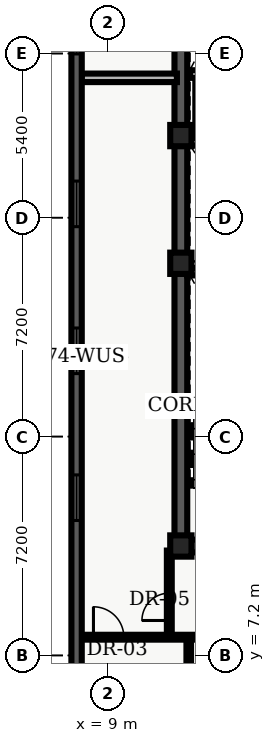
"""IFC4 building model, lengths in metres.
Left out: names, types, materials, properties, quantities, classifications, styles, units other than length and angle.
Written with IfcOpenShell. Run it as: python <this file> out.ifc"""

import sys

from ifc_helpers import new_model, entity, si_unit, converted_unit, direction, frame, origin_with_axes, origin_2d_with_axis, place, context, subcontext, project, spatial, polyline, rectangle, outline, extrude, element, fill, save


model = new_model("IFC4")
c1 = context("Model", 3, precision=1e-05, world=origin_with_axes(), true_north=direction((0.0, 1.0)))
c2 = subcontext(c1, "Body", "Model", "MODEL_VIEW")
j1 = project(units=[si_unit("LENGTHUNIT", "METRE"), converted_unit("PLANEANGLEUNIT", "DEGREE", entity("IfcPlaneAngleMeasure", 0.017), si_unit("PLANEANGLEUNIT", "RADIAN"), dimensions=[0, 0, 0, 0, 0, 0, 0])], contexts=[c1])
p1 = place(None, origin_with_axes())
s1 = spatial("IfcSite", under=j1, at=p1, CompositionType="ELEMENT")
p2 = place(p1, origin_with_axes())
s2 = spatial("IfcBuilding", under=s1, at=p2, CompositionType="ELEMENT")
p3 = place(p2, frame((0.0, 0.0, 299.7), z_axis=(0.0, 0.0, 1.0), x_axis=(1.0, 0.0, 0.0)))
s3 = spatial("IfcBuildingStorey", under=s2, at=p3, CompositionType="ELEMENT", Elevation=299.7)
p4 = place(p3, frame((11.4, 10.8, 0.0), z_axis=(0.0, 0.0, 1.0), x_axis=(0.0, 1.0, 0.0)))
e1 = element("IfcWall", 1, at=p4, inside=s3, PredefinedType="SHEAR", context=c2, shape_type="SweptSolid", body=[
    extrude(outline(polyline([(0.0, -0.21), (27.0, -0.21), (27.0, 0.21), (0.0, 0.21), (0.0, -0.21)])), origin_with_axes(), (0.0, 0.0, 1.0), 3.6),
])
p5 = place(p3, frame((11.4, 10.8, 0.0), z_axis=(0.0, 0.0, 1.0), x_axis=(1.0, 0.0, 0.0)))
e2 = element("IfcWall", 2, at=p5, inside=s3, PredefinedType="SHEAR", context=c2, shape_type="SweptSolid", body=[
    extrude(outline(polyline([(0.0, -0.21), (7.2, -0.21), (7.2, 0.21), (0.0, 0.21), (0.0, -0.21)])), origin_with_axes(), (0.0, 0.0, 1.0), 3.6),
])
p6 = place(p5, frame((2.625, 0.0, 0.0), z_axis=(0.0, 0.0, 1.0), x_axis=(1.0, 0.0, 0.0)))
e3 = element("IfcOpeningElement", 3, at=p6, cuts=e2, PredefinedType="OPENING", context=c2, shape_type="SweptSolid", body=[
    extrude(rectangle(XDim=1.05, YDim=0.44, at=origin_2d_with_axis()), origin_with_axes(), (0.0, 0.0, 1.0), 2.15),
])
p7 = place(p3, frame((11.61, 19.825, 0.0), z_axis=(0.0, 0.0, 1.0), x_axis=(1.0, 0.0, 0.0)))
e4 = element("IfcWall", 4, at=p7, inside=s3, PredefinedType="SHEAR", context=c2, shape_type="SweptSolid", body=[
    extrude(outline(polyline([(0.0, -0.125), (6.78, -0.125), (6.78, 0.125), (0.0, 0.125), (0.0, -0.125)])), origin_with_axes(), (0.0, 0.0, 1.0), 3.6),
])
p8 = place(p3, frame((11.7, 24.1, 0.0), z_axis=(0.0, 0.0, 1.0), x_axis=(1.0, 0.0, 0.0)))
e5 = element("IfcWall", 5, at=p8, inside=s3, PredefinedType="SOLIDWALL", context=c2, shape_type="SweptSolid", body=[
    extrude(outline(polyline([(0.0, -0.125), (6.6, -0.125), (6.6, 0.125), (0.0, 0.125), (0.0, -0.125)])), origin_with_axes(), (0.0, 0.0, 1.0), 2.64),
])
p9 = place(p8, frame((3.6, 0.0, 0.0), z_axis=(0.0, 0.0, 1.0), x_axis=(1.0, 0.0, 0.0)))
e6 = element("IfcOpeningElement", 6, at=p9, cuts=e5, PredefinedType="OPENING", context=c2, shape_type="SweptSolid", body=[
    extrude(rectangle(XDim=0.9, YDim=0.27, at=origin_2d_with_axis()), origin_with_axes(), (0.0, 0.0, 1.0), 2.15),
])
p10 = place(p8, frame((5.65, 0.0, 0.0), z_axis=(0.0, 0.0, 1.0), x_axis=(1.0, 0.0, 0.0)))
e7 = element("IfcOpeningElement", 7, at=p10, cuts=e5, PredefinedType="OPENING", context=c2, shape_type="SweptSolid", body=[
    extrude(rectangle(XDim=0.9, YDim=0.27, at=origin_2d_with_axis()), origin_with_axes(), (0.0, 0.0, 1.0), 2.15),
])
p11 = place(p3, frame((11.7, 26.325, 0.0), z_axis=(0.0, 0.0, 1.0), x_axis=(1.0, 0.0, 0.0)))
e8 = element("IfcWall", 8, at=p11, inside=s3, PredefinedType="SOLIDWALL", context=c2, shape_type="SweptSolid", body=[
    extrude(outline(polyline([(0.0, -0.125), (6.6, -0.125), (6.6, 0.125), (0.0, 0.125), (0.0, -0.125)])), origin_with_axes(), (0.0, 0.0, 1.0), 2.64),
])
p12 = place(p11, frame((3.5, 0.0, 0.0), z_axis=(0.0, 0.0, 1.0), x_axis=(1.0, 0.0, 0.0)))
e9 = element("IfcOpeningElement", 9, at=p12, cuts=e8, PredefinedType="OPENING", context=c2, shape_type="SweptSolid", body=[
    extrude(rectangle(XDim=0.9, YDim=0.27, at=origin_2d_with_axis()), origin_with_axes(), (0.0, 0.0, 1.0), 2.15),
])
for number, where, z_axis, x_axis in (
    (10, (11.4, 10.8, 0.0), (0.0, 0.0, 1.0), (1.0, 0.0, 0.0)),
    (11, (11.4, 20.1, 0.0), (0.0, 0.0, 1.0), (1.0, 0.0, 0.0)),
    (12, (11.4, 24.3, 0.0), (0.0, 0.0, 1.0), (1.0, 0.0, 0.0)),
):
    element("IfcColumn", number, at=place(p3, frame(where, z_axis=z_axis, x_axis=x_axis)), inside=s3, PredefinedType="COLUMN", context=c2, shape_type="SweptSolid", body=[
        extrude(rectangle(XDim=0.7, YDim=0.7, at=origin_2d_with_axis()), origin_with_axes(), (0.0, 0.0, 1.0), 3.9),
    ])
p13 = place(p3, frame((8.135, 7.8, 0.0), z_axis=(0.0, 0.0, 1.0), x_axis=(1.0, 0.0, 0.0)))
e13 = element("IfcWall", 13, at=p13, inside=s3, PredefinedType="PARTITIONING", context=c2, shape_type="SweptSolid", body=[
    extrude(outline(polyline([(0.0, -0.08), (12.165, -0.08), (12.165, 0.08), (0.0, 0.08), (0.0, -0.08)])), origin_with_axes(), (0.0, 0.0, 1.0), 2.64),
])
p14 = place(p13, frame((0.89, 0.0, 0.0), z_axis=(0.0, 0.0, 1.0), x_axis=(1.0, 0.0, 0.0)))
e14 = element("IfcOpeningElement", 14, at=p14, cuts=e13, PredefinedType="OPENING", context=c2, shape_type="SweptSolid", body=[
    extrude(rectangle(XDim=1.0, YDim=0.18, at=origin_2d_with_axis()), origin_with_axes(), (0.0, 0.0, 1.0), 2.15),
])
p15 = place(p13, frame((5.482, 0.0, 0.0), z_axis=(0.0, 0.0, 1.0), x_axis=(1.0, 0.0, 0.0)))
e15 = element("IfcOpeningElement", 15, at=p15, cuts=e13, PredefinedType="OPENING", context=c2, shape_type="SweptSolid", body=[
    extrude(rectangle(XDim=1.0, YDim=0.18, at=origin_2d_with_axis()), origin_with_axes(), (0.0, 0.0, 1.0), 2.15),
])
p16 = place(p13, frame((9.777, 0.0, 0.0), z_axis=(0.0, 0.0, 1.0), x_axis=(1.0, 0.0, 0.0)))
e16 = element("IfcOpeningElement", 16, at=p16, cuts=e13, PredefinedType="OPENING", context=c2, shape_type="SweptSolid", body=[
    extrude(rectangle(XDim=1.0, YDim=0.18, at=origin_2d_with_axis()), origin_with_axes(), (0.0, 0.0, 1.0), 2.15),
])
p17 = place(p3, frame((11.02, 7.8, 0.0), z_axis=(0.0, 0.0, 1.0), x_axis=(0.0, 1.0, 0.0)))
e17 = element("IfcWall", 17, at=p17, inside=s3, PredefinedType="PARTITIONING", context=c2, shape_type="SweptSolid", body=[
    extrude(outline(polyline([(0.0, -0.08), (2.85, -0.08), (2.85, 0.08), (0.0, 0.08), (0.0, -0.08)])), origin_with_axes(), (0.0, 0.0, 1.0), 2.64),
])
p18 = place(p17, frame((1.0, 0.0, 0.0), z_axis=(0.0, 0.0, 1.0), x_axis=(1.0, 0.0, 0.0)))
e18 = element("IfcOpeningElement", 18, at=p18, cuts=e17, PredefinedType="OPENING", context=c2, shape_type="SweptSolid", body=[
    extrude(rectangle(XDim=0.9, YDim=0.18, at=origin_2d_with_axis()), origin_with_axes(), (0.0, 0.0, 1.0), 2.15),
])
p19 = place(p3, frame((8.135, 26.2, 0.0), z_axis=(0.0, 0.0, 1.0), x_axis=(1.0, 0.0, 0.0)))
e19 = element("IfcWall", 19, at=p19, inside=s3, PredefinedType="PARTITIONING", context=c2, shape_type="SweptSolid", body=[
    extrude(outline(polyline([(0.0, -0.14), (3.135, -0.14), (3.135, 0.14), (0.0, 0.14), (0.0, -0.14)])), origin_with_axes(), (0.0, 0.0, 1.0), 2.64),
])
p20 = place(p3, frame((11.659, 2.135, 0.0), z_axis=(0.0, 0.0, 1.0), x_axis=(0.0, 1.0, 0.0)))
e20 = element("IfcWall", 20, at=p20, inside=s3, PredefinedType="PARTITIONING", context=c2, shape_type="SweptSolid", body=[
    extrude(outline(polyline([(0.0, -0.075), (5.565, -0.075), (5.565, 0.075), (0.0, 0.075), (0.0, -0.075)])), origin_with_axes(), (0.0, 0.0, 1.0), 2.64),
])
p21 = place(p3, frame((7.97, 4.54, 0.0), z_axis=(0.0, 0.0, 1.0), x_axis=(0.0, 1.0, 0.0)))
e21 = element("IfcWall", 21, at=p21, inside=s3, PredefinedType="SOLIDWALL", context=c2, shape_type="SweptSolid", body=[
    extrude(outline(polyline([(0.0, -0.17), (39.86, -0.17), (39.86, 0.17), (0.0, 0.17), (0.0, -0.17)])), origin_with_axes(), (0.0, 0.0, 1.0), 3.6),
])
p22 = place(p21, frame((7.849, 0.0, 0.45), z_axis=(0.0, 0.0, 1.0), x_axis=(1.0, 0.0, 0.0)))
e22 = element("IfcOpeningElement", 22, at=p22, cuts=e21, PredefinedType="OPENING", context=c2, shape_type="SweptSolid", body=[
    extrude(rectangle(XDim=1.5, YDim=0.36, at=origin_2d_with_axis()), origin_with_axes(), (0.0, 0.0, 1.0), 2.1),
])
p23 = place(p21, frame((12.681, 0.0, 0.45), z_axis=(0.0, 0.0, 1.0), x_axis=(1.0, 0.0, 0.0)))
e23 = element("IfcOpeningElement", 23, at=p23, cuts=e21, PredefinedType="OPENING", context=c2, shape_type="SweptSolid", body=[
    extrude(rectangle(XDim=1.5, YDim=0.36, at=origin_2d_with_axis()), origin_with_axes(), (0.0, 0.0, 1.0), 2.1),
])
p24 = place(p21, frame((17.514, 0.0, 0.45), z_axis=(0.0, 0.0, 1.0), x_axis=(1.0, 0.0, 0.0)))
e24 = element("IfcOpeningElement", 24, at=p24, cuts=e21, PredefinedType="OPENING", context=c2, shape_type="SweptSolid", body=[
    extrude(rectangle(XDim=1.5, YDim=0.36, at=origin_2d_with_axis()), origin_with_axes(), (0.0, 0.0, 1.0), 2.1),
])
p25 = place(p21, frame((23.196, 0.0, 0.45), z_axis=(0.0, 0.0, 1.0), x_axis=(1.0, 0.0, 0.0)))
e25 = element("IfcOpeningElement", 25, at=p25, cuts=e21, PredefinedType="OPENING", context=c2, shape_type="SweptSolid", body=[
    extrude(rectangle(XDim=1.5, YDim=0.36, at=origin_2d_with_axis()), origin_with_axes(), (0.0, 0.0, 1.0), 2.1),
])
p26 = place(p21, frame((27.179, 0.0, 0.45), z_axis=(0.0, 0.0, 1.0), x_axis=(1.0, 0.0, 0.0)))
e26 = element("IfcOpeningElement", 26, at=p26, cuts=e21, PredefinedType="OPENING", context=c2, shape_type="SweptSolid", body=[
    extrude(rectangle(XDim=1.5, YDim=0.36, at=origin_2d_with_axis()), origin_with_axes(), (0.0, 0.0, 1.0), 2.1),
])
p27 = place(p21, frame((32.011, 0.0, 0.45), z_axis=(0.0, 0.0, 1.0), x_axis=(1.0, 0.0, 0.0)))
e27 = element("IfcOpeningElement", 27, at=p27, cuts=e21, PredefinedType="OPENING", context=c2, shape_type="SweptSolid", body=[
    extrude(rectangle(XDim=1.5, YDim=0.36, at=origin_2d_with_axis()), origin_with_axes(), (0.0, 0.0, 1.0), 2.1),
])
p28 = place(p21, frame((37.294, 0.0, 0.45), z_axis=(0.0, 0.0, 1.0), x_axis=(1.0, 0.0, 0.0)))
e28 = element("IfcOpeningElement", 28, at=p28, cuts=e21, PredefinedType="OPENING", context=c2, shape_type="SweptSolid", body=[
    extrude(rectangle(XDim=1.5, YDim=0.36, at=origin_2d_with_axis()), origin_with_axes(), (0.0, 0.0, 1.0), 2.1),
])
p29 = place(p17, frame((1.0, 0.0, 0.0), z_axis=(0.0, 0.0, 1.0), x_axis=(1.0, 0.0, 0.0)))
e29 = element("IfcDoor", 29, at=p29, inside=s3, OperationType="SINGLE_SWING_LEFT", PredefinedType="DOOR", context=c2, shape_type="SweptSolid", body=[
    extrude(rectangle(XDim=0.9, YDim=0.09, at=origin_2d_with_axis()), origin_with_axes(), (0.0, 0.0, 1.0), 2.15),
])
fill(e18, e29)
p30 = place(p13, frame((0.89, 0.0, 0.0), z_axis=(0.0, 0.0, 1.0), x_axis=(1.0, 0.0, 0.0)))
e30 = element("IfcDoor", 30, at=p30, inside=s3, OperationType="SINGLE_SWING_LEFT", PredefinedType="DOOR", context=c2, shape_type="SweptSolid", body=[
    extrude(rectangle(XDim=1.0, YDim=0.09, at=origin_2d_with_axis()), origin_with_axes(), (0.0, 0.0, 1.0), 2.15),
])
fill(e14, e30)
p31 = place(p21, frame((7.849, 0.0, 0.45), z_axis=(0.0, 0.0, 1.0), x_axis=(1.0, 0.0, 0.0)))
e31 = element("IfcWindow", 31, at=p31, inside=s3, PredefinedType="WINDOW", context=c2, shape_type="SweptSolid", body=[
    extrude(rectangle(XDim=1.5, YDim=0.09, at=origin_2d_with_axis()), origin_with_axes(), (0.0, 0.0, 1.0), 2.1),
])
fill(e22, e31)
p32 = place(p21, frame((12.681, 0.0, 0.45), z_axis=(0.0, 0.0, 1.0), x_axis=(1.0, 0.0, 0.0)))
e32 = element("IfcWindow", 32, at=p32, inside=s3, PredefinedType="WINDOW", context=c2, shape_type="SweptSolid", body=[
    extrude(rectangle(XDim=1.5, YDim=0.09, at=origin_2d_with_axis()), origin_with_axes(), (0.0, 0.0, 1.0), 2.1),
])
fill(e23, e32)
p33 = place(p21, frame((17.514, 0.0, 0.45), z_axis=(0.0, 0.0, 1.0), x_axis=(1.0, 0.0, 0.0)))
e33 = element("IfcWindow", 33, at=p33, inside=s3, PredefinedType="WINDOW", context=c2, shape_type="SweptSolid", body=[
    extrude(rectangle(XDim=1.5, YDim=0.09, at=origin_2d_with_axis()), origin_with_axes(), (0.0, 0.0, 1.0), 2.1),
])
fill(e24, e33)
p34 = place(p21, frame((23.196, 0.0, 0.45), z_axis=(0.0, 0.0, 1.0), x_axis=(1.0, 0.0, 0.0)))
e34 = element("IfcWindow", 34, at=p34, inside=s3, PredefinedType="WINDOW", context=c2, shape_type="SweptSolid", body=[
    extrude(rectangle(XDim=1.5, YDim=0.09, at=origin_2d_with_axis()), origin_with_axes(), (0.0, 0.0, 1.0), 2.1),
])
fill(e25, e34)
save(model, sys.argv[1])
